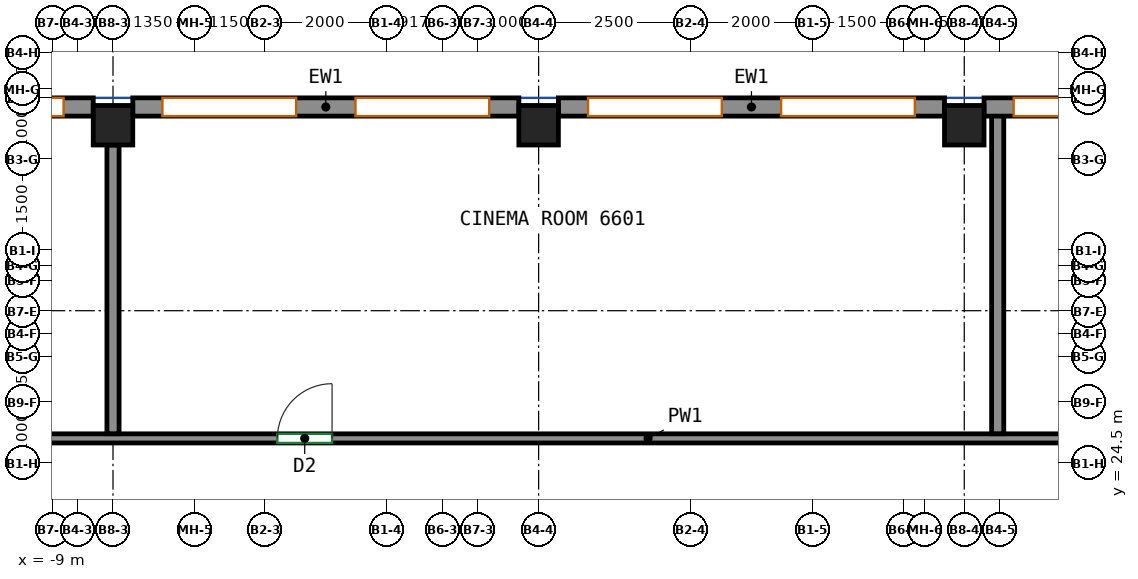
"""IFC4 building model, lengths in metres.
Left out: names, types, materials, properties, quantities, classifications, styles, units other than length and angle.
Written with IfcOpenShell. Run it as: python <this file> out.ifc"""

import sys

from ifc_helpers import new_model, si_unit, direction, frame, frame_2d, origin, origin_2d, place, context, subcontext, project, spatial, rectangle, extrude, source, transform, mapped, element, fill, save


model = new_model("IFC4")
c1 = context("Model", 3, precision=1e-05, world=origin(), true_north=direction((0.0, 1.0)))
c2 = subcontext(c1, "Body", "Model", "MODEL_VIEW")
j1 = project(units=[si_unit("LENGTHUNIT", "METRE"), si_unit("PLANEANGLEUNIT", "RADIAN")], contexts=[c1])
p1 = place(None, origin())
s1 = spatial("IfcSite", under=j1, at=p1, CompositionType="ELEMENT")
p2 = place(p1, origin())
s2 = spatial("IfcBuilding", under=s1, at=p2, CompositionType="ELEMENT")
p3 = place(p2, frame((0.0, 0.0, 270.4)))
s3 = spatial("IfcBuildingStorey", under=s2, at=p3, CompositionType="ELEMENT", Elevation=270.4)
m1 = source(origin(), c2, "Body", "SweptSolid", [
    extrude(rectangle(XDim=0.65, YDim=0.65, at=origin_2d()), origin(), (0.0, 0.0, 1.0), 3.12),
])
for number, where, z_axis, x_axis in (
    (1, (-8.0, 30.05, 0.0), (0.0, 0.0, 1.0), (1.0, 0.0, 0.0)),
    (2, (-1.0, 30.05, 0.0), (0.0, 0.0, 1.0), (1.0, 0.0, 0.0)),
    (3, (6.0, 30.05, 0.0), (0.0, 0.0, 1.0), (1.0, 0.0, 0.0)),
):
    element("IfcColumn", number, at=place(p3, frame(where, z_axis=z_axis, x_axis=x_axis)), inside=s3, PredefinedType="COLUMN", context=c2, shape_type="MappedRepresentation", body=[
        mapped(m1, transform((0.0, 0.0, 0.0))),
    ])
m2 = source(origin(), c2, "Body", "SweptSolid", [
    extrude(rectangle(XDim=6.35, YDim=0.3, at=frame_2d((3.175, 0.0))), origin(), (0.0, 0.0, 1.0), 3.12),
])
p4 = place(p3, frame((12.675, 30.35, 0.0), z_axis=(0.0, 0.0, 1.0), x_axis=(-1.0, 0.0, 0.0)))
e4 = element("IfcWall", 4, at=p4, inside=s3, PredefinedType="SOLIDWALL", context=c2, shape_type="MappedRepresentation", body=[
    mapped(m2, transform((0.0, 0.0, 0.0))),
])
p5 = place(p4, frame((0.488, 0.0, 0.8)))
e5 = element("IfcOpeningElement", 5, at=p5, cuts=e4, PredefinedType="OPENING", context=c2, shape_type="SweptSolid", body=[
    extrude(rectangle(XDim=2.2, YDim=2.05, at=frame_2d((1.1, 1.025))), frame((0.0, 0.16, 0.0), z_axis=(0.0, -1.0, 0.0), x_axis=(1.0, 0.0, 0.0)), (0.0, 0.0, 1.0), 0.32),
])
p6 = place(p4, frame((3.663, 0.0, 0.8)))
e6 = element("IfcOpeningElement", 6, at=p6, cuts=e4, PredefinedType="OPENING", context=c2, shape_type="SweptSolid", body=[
    extrude(rectangle(XDim=2.2, YDim=2.05, at=frame_2d((1.1, 1.025))), frame((0.0, 0.16, 0.0), z_axis=(0.0, -1.0, 0.0), x_axis=(1.0, 0.0, 0.0)), (0.0, 0.0, 1.0), 0.32),
])
p7 = place(p3, frame((5.675, 30.35, 0.0), z_axis=(0.0, 0.0, 1.0), x_axis=(-1.0, 0.0, 0.0)))
e7 = element("IfcWall", 7, at=p7, inside=s3, PredefinedType="SOLIDWALL", context=c2, shape_type="MappedRepresentation", body=[
    mapped(m2, transform((0.0, 0.0, 0.0))),
])
p8 = place(p7, frame((0.488, 0.0, 0.8)))
e8 = element("IfcOpeningElement", 8, at=p8, cuts=e7, PredefinedType="OPENING", context=c2, shape_type="SweptSolid", body=[
    extrude(rectangle(XDim=2.2, YDim=2.05, at=frame_2d((1.1, 1.025))), frame((0.0, 0.16, 0.0), z_axis=(0.0, -1.0, 0.0), x_axis=(1.0, 0.0, 0.0)), (0.0, 0.0, 1.0), 0.32),
])
p9 = place(p7, frame((3.663, 0.0, 0.8)))
e9 = element("IfcOpeningElement", 9, at=p9, cuts=e7, PredefinedType="OPENING", context=c2, shape_type="SweptSolid", body=[
    extrude(rectangle(XDim=2.2, YDim=2.05, at=frame_2d((1.1, 1.025))), frame((0.0, 0.16, 0.0), z_axis=(0.0, -1.0, 0.0), x_axis=(1.0, 0.0, 0.0)), (0.0, 0.0, 1.0), 0.32),
])
p10 = place(p3, frame((-1.325, 30.35, 0.0), z_axis=(0.0, 0.0, 1.0), x_axis=(-1.0, 0.0, 0.0)))
e10 = element("IfcWall", 10, at=p10, inside=s3, PredefinedType="SOLIDWALL", context=c2, shape_type="MappedRepresentation", body=[
    mapped(m2, transform((0.0, 0.0, 0.0))),
])
p11 = place(p10, frame((0.488, 0.0, 0.8)))
e11 = element("IfcOpeningElement", 11, at=p11, cuts=e10, PredefinedType="OPENING", context=c2, shape_type="SweptSolid", body=[
    extrude(rectangle(XDim=2.2, YDim=2.05, at=frame_2d((1.1, 1.025))), frame((0.0, 0.16, 0.0), z_axis=(0.0, -1.0, 0.0), x_axis=(1.0, 0.0, 0.0)), (0.0, 0.0, 1.0), 0.32),
])
p12 = place(p10, frame((3.663, 0.0, 0.8)))
e12 = element("IfcOpeningElement", 12, at=p12, cuts=e10, PredefinedType="OPENING", context=c2, shape_type="SweptSolid", body=[
    extrude(rectangle(XDim=2.2, YDim=2.05, at=frame_2d((1.1, 1.025))), frame((0.0, 0.16, 0.0), z_axis=(0.0, -1.0, 0.0), x_axis=(1.0, 0.0, 0.0)), (0.0, 0.0, 1.0), 0.32),
])
p13 = place(p3, frame((-8.325, 30.35, 0.0), z_axis=(0.0, 0.0, 1.0), x_axis=(-1.0, 0.0, 0.0)))
e13 = element("IfcWall", 13, at=p13, inside=s3, PredefinedType="SOLIDWALL", context=c2, shape_type="MappedRepresentation", body=[
    mapped(m2, transform((0.0, 0.0, 0.0))),
])
p14 = place(p13, frame((0.488, 0.0, 0.8)))
e14 = element("IfcOpeningElement", 14, at=p14, cuts=e13, PredefinedType="OPENING", context=c2, shape_type="SweptSolid", body=[
    extrude(rectangle(XDim=2.2, YDim=2.05, at=frame_2d((1.1, 1.025))), frame((0.0, 0.16, 0.0), z_axis=(0.0, -1.0, 0.0), x_axis=(1.0, 0.0, 0.0)), (0.0, 0.0, 1.0), 0.32),
])
p15 = place(p13, frame((3.663, 0.0, 0.8)))
e15 = element("IfcOpeningElement", 15, at=p15, cuts=e13, PredefinedType="OPENING", context=c2, shape_type="SweptSolid", body=[
    extrude(rectangle(XDim=2.2, YDim=2.05, at=frame_2d((1.1, 1.025))), frame((0.0, 0.16, 0.0), z_axis=(0.0, -1.0, 0.0), x_axis=(1.0, 0.0, 0.0)), (0.0, 0.0, 1.0), 0.32),
])
p16 = place(p3, frame((-19.075, 24.9, 0.0), z_axis=(0.0, 0.0, 1.0), x_axis=(1.0, 0.0, 0.0)))
e16 = element("IfcWall", 16, at=p16, inside=s3, PredefinedType="PARTITIONING", context=c2, shape_type="SweptSolid", body=[
    extrude(rectangle(XDim=39.75, YDim=0.15, at=frame_2d((19.875, 0.0))), origin(), (0.0, 0.0, 1.0), 3.12),
])
p17 = place(p16, frame((8.674, 0.0, 0.0)))
e17 = element("IfcOpeningElement", 17, at=p17, cuts=e16, PredefinedType="OPENING", context=c2, shape_type="SweptSolid", body=[
    extrude(rectangle(XDim=0.9, YDim=2.1, at=frame_2d((0.45, 1.05))), frame((0.0, 0.085, 0.0), z_axis=(0.0, -1.0, 0.0), x_axis=(1.0, 0.0, 0.0)), (0.0, 0.0, 1.0), 0.17),
])
p18 = place(p16, frame((13.778, 0.0, 0.0)))
e18 = element("IfcOpeningElement", 18, at=p18, cuts=e16, PredefinedType="OPENING", context=c2, shape_type="SweptSolid", body=[
    extrude(rectangle(XDim=0.9, YDim=2.1, at=frame_2d((0.45, 1.05))), frame((0.0, 0.085, 0.0), z_axis=(0.0, -1.0, 0.0), x_axis=(1.0, 0.0, 0.0)), (0.0, 0.0, 1.0), 0.17),
])
p19 = place(p3, frame((6.55, 24.977, 0.0), z_axis=(0.0, 0.0, 1.0), x_axis=(0.0, 1.0, 0.0)))
e19 = element("IfcWall", 19, at=p19, inside=s3, PredefinedType="PARTITIONING", context=c2, shape_type="SweptSolid", body=[
    extrude(rectangle(XDim=5.273, YDim=0.2, at=frame_2d((2.636, 0.0))), origin(), (0.0, 0.0, 1.0), 3.12),
])
p20 = place(p3, frame((-8.0, 29.725, 0.0), z_axis=(0.0, 0.0, 1.0), x_axis=(0.0, -1.0, 0.0)))
e20 = element("IfcWall", 20, at=p20, inside=s3, PredefinedType="PARTITIONING", context=c2, shape_type="SweptSolid", body=[
    extrude(rectangle(XDim=4.748, YDim=0.2, at=frame_2d((2.374, 0.0))), origin(), (0.0, 0.0, 1.0), 3.12),
])
p21 = place(p6, origin())
e21 = element("IfcWindow", 21, at=p21, inside=s3, PartitioningType="SINGLE_PANEL", PredefinedType="WINDOW", context=c2, shape_type="SweptSolid", body=[
    extrude(rectangle(XDim=2.2, YDim=2.05, at=frame_2d((1.1, 1.025))), frame((0.0, 0.03, 0.0), z_axis=(0.0, -1.0, 0.0), x_axis=(1.0, 0.0, 0.0)), (0.0, 0.0, 1.0), 0.06),
])
fill(e6, e21)
p22 = place(p8, origin())
e22 = element("IfcWindow", 22, at=p22, inside=s3, PartitioningType="SINGLE_PANEL", PredefinedType="WINDOW", context=c2, shape_type="SweptSolid", body=[
    extrude(rectangle(XDim=2.2, YDim=2.05, at=frame_2d((1.1, 1.025))), frame((0.0, 0.03, 0.0), z_axis=(0.0, -1.0, 0.0), x_axis=(1.0, 0.0, 0.0)), (0.0, 0.0, 1.0), 0.06),
])
fill(e8, e22)
p23 = place(p9, origin())
e23 = element("IfcWindow", 23, at=p23, inside=s3, PartitioningType="SINGLE_PANEL", PredefinedType="WINDOW", context=c2, shape_type="SweptSolid", body=[
    extrude(rectangle(XDim=2.2, YDim=2.05, at=frame_2d((1.1, 1.025))), frame((0.0, 0.03, 0.0), z_axis=(0.0, -1.0, 0.0), x_axis=(1.0, 0.0, 0.0)), (0.0, 0.0, 1.0), 0.06),
])
fill(e9, e23)
p24 = place(p11, origin())
e24 = element("IfcWindow", 24, at=p24, inside=s3, PartitioningType="SINGLE_PANEL", PredefinedType="WINDOW", context=c2, shape_type="SweptSolid", body=[
    extrude(rectangle(XDim=2.2, YDim=2.05, at=frame_2d((1.1, 1.025))), frame((0.0, 0.03, 0.0), z_axis=(0.0, -1.0, 0.0), x_axis=(1.0, 0.0, 0.0)), (0.0, 0.0, 1.0), 0.06),
])
fill(e11, e24)
p25 = place(p12, origin())
e25 = element("IfcWindow", 25, at=p25, inside=s3, PartitioningType="SINGLE_PANEL", PredefinedType="WINDOW", context=c2, shape_type="SweptSolid", body=[
    extrude(rectangle(XDim=2.2, YDim=2.05, at=frame_2d((1.1, 1.025))), frame((0.0, 0.03, 0.0), z_axis=(0.0, -1.0, 0.0), x_axis=(1.0, 0.0, 0.0)), (0.0, 0.0, 1.0), 0.06),
])
fill(e12, e25)
p26 = place(p14, origin())
e26 = element("IfcWindow", 26, at=p26, inside=s3, PartitioningType="SINGLE_PANEL", PredefinedType="WINDOW", context=c2, shape_type="SweptSolid", body=[
    extrude(rectangle(XDim=2.2, YDim=2.05, at=frame_2d((1.1, 1.025))), frame((0.0, 0.03, 0.0), z_axis=(0.0, -1.0, 0.0), x_axis=(1.0, 0.0, 0.0)), (0.0, 0.0, 1.0), 0.06),
])
fill(e14, e26)
p27 = place(p18, origin())
e27 = element("IfcDoor", 27, at=p27, inside=s3, OperationType="SINGLE_SWING_RIGHT", PredefinedType="DOOR", context=c2, shape_type="SweptSolid", body=[
    extrude(rectangle(XDim=0.9, YDim=2.1, at=frame_2d((0.45, 1.05))), frame((0.0, 0.025, 0.0), z_axis=(0.0, -1.0, 0.0), x_axis=(1.0, 0.0, 0.0)), (0.0, 0.0, 1.0), 0.05),
])
fill(e18, e27)
save(model, sys.argv[1])
